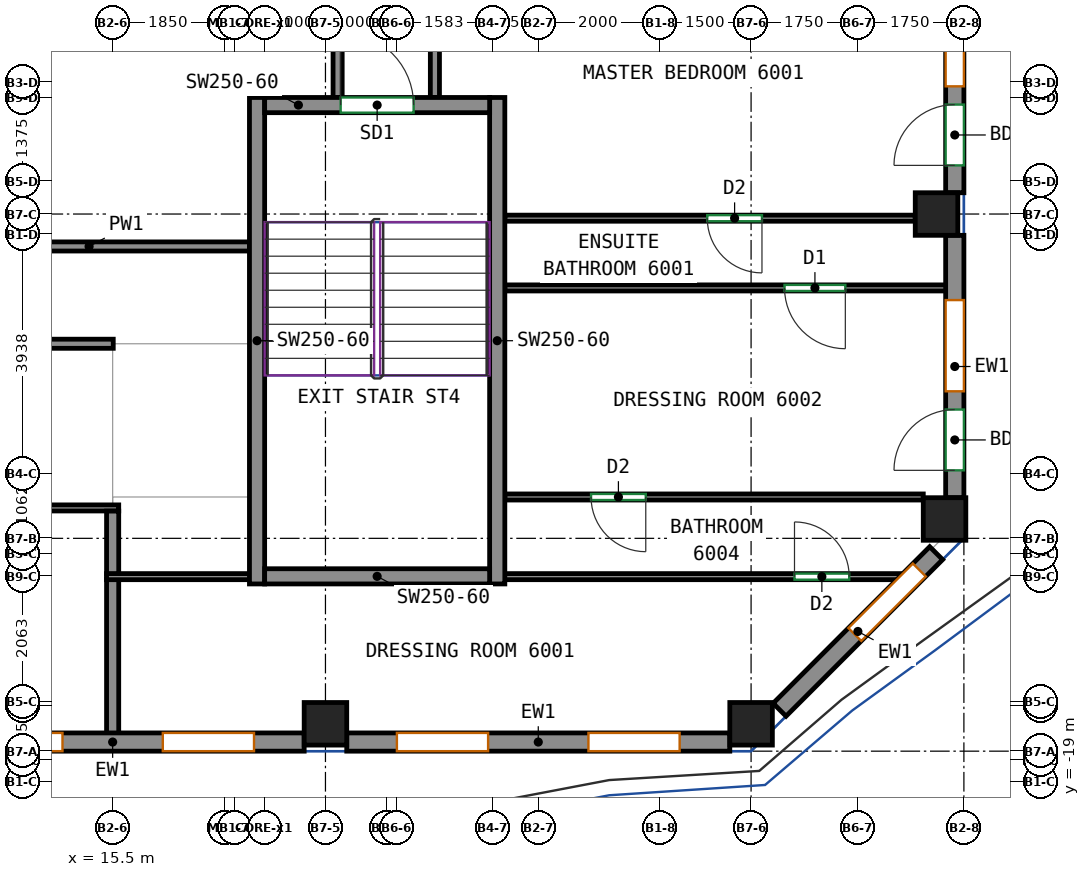
"""IFC4 building model, lengths in metres.
Left out: names, types, materials, properties, quantities, classifications, styles, units other than length and angle.
Written with IfcOpenShell. Run it as: python <this file> out.ifc"""

import sys

from ifc_helpers import new_model, si_unit, direction, frame, frame_2d, origin, origin_2d, place, context, subcontext, project, spatial, rectangle, extrude, source, transform, mapped, element, fill, save


model = new_model("IFC4")
c1 = context("Model", 3, precision=1e-05, world=origin(), true_north=direction((0.0, 1.0)))
c2 = subcontext(c1, "Body", "Model", "MODEL_VIEW")
j1 = project(units=[si_unit("LENGTHUNIT", "METRE"), si_unit("PLANEANGLEUNIT", "RADIAN")], contexts=[c1])
p1 = place(None, origin())
s1 = spatial("IfcSite", under=j1, at=p1, CompositionType="ELEMENT")
p2 = place(p1, origin())
s2 = spatial("IfcBuilding", under=s1, at=p2, CompositionType="ELEMENT")
p3 = place(p2, frame((0.0, 0.0, 249.2)))
s3 = spatial("IfcBuildingStorey", under=s2, at=p3, CompositionType="ELEMENT", Elevation=249.2)
m1 = source(origin(), c2, "Body", "SweptSolid", [
    extrude(rectangle(XDim=0.7, YDim=0.7, at=origin_2d()), origin(), (0.0, 0.0, 1.0), 3.12),
])
for number, where, z_axis, x_axis in (
    (1, (19.0, -18.05, 0.0), (0.0, 0.0, 1.0), (1.0, 0.0, 0.0)),
    (2, (26.0, -18.05, 0.0), (0.0, 0.0, 1.0), (1.0, 0.0, 0.0)),
    (3, (29.05, -9.667, 0.0), (0.0, 0.0, 1.0), (1.0, 0.0, 0.0)),
    (4, (29.182, -14.682, 0.0), (0.0, 0.0, 1.0), (1.0, 0.0, 0.0)),
):
    element("IfcColumn", number, at=place(p3, frame(where, z_axis=z_axis, x_axis=x_axis)), inside=s3, PredefinedType="COLUMN", context=c2, shape_type="MappedRepresentation", body=[
        mapped(m1, transform((0.0, 0.0, 0.0))),
    ])
m2 = source(origin(), c2, "Body", "SweptSolid", [
    extrude(rectangle(XDim=8.0, YDim=0.25, at=frame_2d((4.0, 0.0))), origin(), (0.0, 0.0, 1.0), 3.12),
])
for number, where, z_axis, x_axis in (
    (5, (17.875, -15.75, 0.0), (0.0, 0.0, 1.0), (0.0, 1.0, 0.0)),
    (6, (21.825, -15.75, 0.0), (0.0, 0.0, 1.0), (0.0, 1.0, 0.0)),
):
    element("IfcWall", number, at=place(p3, frame(where, z_axis=z_axis, x_axis=x_axis)), inside=s3, PredefinedType="SHEAR", context=c2, shape_type="MappedRepresentation", body=[
        mapped(m2, transform((0.0, 0.0, 0.0))),
    ])
m3 = source(origin(), c2, "Body", "SweptSolid", [
    extrude(rectangle(XDim=3.7, YDim=0.25, at=frame_2d((1.85, 0.0))), origin(), (0.0, 0.0, 1.0), 3.12),
])
p4 = place(p3, frame((18.0, -15.625, 0.0), z_axis=(0.0, 0.0, 1.0), x_axis=(1.0, 0.0, 0.0)))
e7 = element("IfcWall", 7, at=p4, inside=s3, PredefinedType="SHEAR", context=c2, shape_type="MappedRepresentation", body=[
    mapped(m3, transform((0.0, 0.0, 0.0))),
])
p5 = place(p3, frame((18.0, -7.875, 0.0), z_axis=(0.0, 0.0, 1.0), x_axis=(1.0, 0.0, 0.0)))
e8 = element("IfcWall", 8, at=p5, inside=s3, PredefinedType="SHEAR", context=c2, shape_type="MappedRepresentation", body=[
    mapped(m3, transform((0.0, 0.0, 0.0))),
])
p6 = place(p5, frame((1.25, 0.0, 0.0)))
e9 = element("IfcOpeningElement", 9, at=p6, cuts=e8, PredefinedType="OPENING", context=c2, shape_type="SweptSolid", body=[
    extrude(rectangle(XDim=1.2, YDim=2.1, at=frame_2d((0.6, 1.05))), frame((0.0, 0.135, 0.0), z_axis=(0.0, -1.0, 0.0), x_axis=(1.0, 0.0, 0.0)), (0.0, 0.0, 1.0), 0.27),
])
m4 = source(origin(), c2, "Body", "SweptSolid", [
    extrude(rectangle(XDim=6.3, YDim=0.3, at=frame_2d((3.15, 0.0))), origin(), (0.0, 0.0, 1.0), 3.12),
])
p7 = place(p3, frame((12.35, -18.35, 0.0), z_axis=(0.0, 0.0, 1.0), x_axis=(1.0, 0.0, 0.0)))
e10 = element("IfcWall", 10, at=p7, inside=s3, PredefinedType="SOLIDWALL", context=c2, shape_type="MappedRepresentation", body=[
    mapped(m4, transform((0.0, 0.0, 0.0))),
])
p8 = place(p7, frame((0.825, 0.0, 0.8)))
e11 = element("IfcOpeningElement", 11, at=p8, cuts=e10, PredefinedType="OPENING", context=c2, shape_type="SweptSolid", body=[
    extrude(rectangle(XDim=1.5, YDim=2.05, at=frame_2d((0.75, 1.025))), frame((0.0, 0.16, 0.0), z_axis=(0.0, -1.0, 0.0), x_axis=(1.0, 0.0, 0.0)), (0.0, 0.0, 1.0), 0.32),
])
p9 = place(p7, frame((3.975, 0.0, 0.8)))
e12 = element("IfcOpeningElement", 12, at=p9, cuts=e10, PredefinedType="OPENING", context=c2, shape_type="SweptSolid", body=[
    extrude(rectangle(XDim=1.5, YDim=2.05, at=frame_2d((0.75, 1.025))), frame((0.0, 0.16, 0.0), z_axis=(0.0, -1.0, 0.0), x_axis=(1.0, 0.0, 0.0)), (0.0, 0.0, 1.0), 0.32),
])
p10 = place(p3, frame((19.35, -18.35, 0.0), z_axis=(0.0, 0.0, 1.0), x_axis=(1.0, 0.0, 0.0)))
e13 = element("IfcWall", 13, at=p10, inside=s3, PredefinedType="SOLIDWALL", context=c2, shape_type="MappedRepresentation", body=[
    mapped(m4, transform((0.0, 0.0, 0.0))),
])
p11 = place(p10, frame((0.825, 0.0, 0.8)))
e14 = element("IfcOpeningElement", 14, at=p11, cuts=e13, PredefinedType="OPENING", context=c2, shape_type="SweptSolid", body=[
    extrude(rectangle(XDim=1.5, YDim=2.05, at=frame_2d((0.75, 1.025))), frame((0.0, 0.16, 0.0), z_axis=(0.0, -1.0, 0.0), x_axis=(1.0, 0.0, 0.0)), (0.0, 0.0, 1.0), 0.32),
])
p12 = place(p10, frame((3.975, 0.0, 0.8)))
e15 = element("IfcOpeningElement", 15, at=p12, cuts=e13, PredefinedType="OPENING", context=c2, shape_type="SweptSolid", body=[
    extrude(rectangle(XDim=1.5, YDim=2.05, at=frame_2d((0.75, 1.025))), frame((0.0, 0.16, 0.0), z_axis=(0.0, -1.0, 0.0), x_axis=(1.0, 0.0, 0.0)), (0.0, 0.0, 1.0), 0.32),
])
m5 = source(origin(), c2, "Body", "SweptSolid", [
    extrude(rectangle(XDim=3.642, YDim=0.3, at=frame_2d((1.821, 0.0))), origin(), (0.0, 0.0, 1.0), 3.12),
])
p13 = place(p3, frame((26.469, -17.819, 0.0), z_axis=(0.0, 0.0, 1.0), x_axis=(0.707106781187, 0.707106781187, 0.0)))
e16 = element("IfcWall", 16, at=p13, inside=s3, PredefinedType="SOLIDWALL", context=c2, shape_type="MappedRepresentation", body=[
    mapped(m5, transform((0.0, 0.0, 0.0))),
])
p14 = place(p13, frame((1.75, 0.0, 0.8)))
e17 = element("IfcOpeningElement", 17, at=p14, cuts=e16, PredefinedType="OPENING", context=c2, shape_type="SweptSolid", body=[
    extrude(rectangle(XDim=1.5, YDim=2.05, at=frame_2d((0.75, 1.025))), frame((0.0, 0.16, 0.0), z_axis=(0.0, -1.0, 0.0), x_axis=(1.0, 0.0, 0.0)), (0.0, 0.0, 1.0), 0.32),
])
m6 = source(origin(), c2, "Body", "SweptSolid", [
    extrude(rectangle(XDim=4.315, YDim=0.3, at=frame_2d((2.158, 0.0))), origin(), (0.0, 0.0, 1.0), 3.12),
])
p15 = place(p3, frame((29.35, -14.332, 0.0), z_axis=(0.0, 0.0, 1.0), x_axis=(0.0, 1.0, 0.0)))
e18 = element("IfcWall", 18, at=p15, inside=s3, PredefinedType="SOLIDWALL", context=c2, shape_type="MappedRepresentation", body=[
    mapped(m6, transform((0.0, 0.0, 0.0))),
])
p16 = place(p15, frame((1.75, 0.0, 0.8)))
e19 = element("IfcOpeningElement", 19, at=p16, cuts=e18, PredefinedType="OPENING", context=c2, shape_type="SweptSolid", body=[
    extrude(rectangle(XDim=1.5, YDim=2.05, at=frame_2d((0.75, 1.025))), frame((0.0, 0.16, 0.0), z_axis=(0.0, -1.0, 0.0), x_axis=(1.0, 0.0, 0.0)), (0.0, 0.0, 1.0), 0.32),
])
p17 = place(p15, frame((0.45, 0.0, 0.0)))
e20 = element("IfcOpeningElement", 20, at=p17, cuts=e18, PredefinedType="OPENING", context=c2, shape_type="SweptSolid", body=[
    extrude(rectangle(XDim=1.0, YDim=2.1, at=frame_2d((0.5, 1.05))), frame((0.0, 0.16, 0.0), z_axis=(0.0, -1.0, 0.0), x_axis=(1.0, 0.0, 0.0)), (0.0, 0.0, 1.0), 0.32),
])
m7 = source(origin(), c2, "Body", "SweptSolid", [
    extrude(rectangle(XDim=8.133, YDim=0.3, at=frame_2d((4.067, 0.0))), origin(), (0.0, 0.0, 1.0), 3.12),
])
p18 = place(p3, frame((29.35, -9.317, 0.0), z_axis=(0.0, 0.0, 1.0), x_axis=(0.0, 1.0, 0.0)))
e21 = element("IfcWall", 21, at=p18, inside=s3, PredefinedType="SOLIDWALL", context=c2, shape_type="MappedRepresentation", body=[
    mapped(m7, transform((0.0, 0.0, 0.0))),
])
p19 = place(p18, frame((1.75, 0.0, 0.8)))
e22 = element("IfcOpeningElement", 22, at=p19, cuts=e21, PredefinedType="OPENING", context=c2, shape_type="SweptSolid", body=[
    extrude(rectangle(XDim=1.5, YDim=2.05, at=frame_2d((0.75, 1.025))), frame((0.0, 0.16, 0.0), z_axis=(0.0, -1.0, 0.0), x_axis=(1.0, 0.0, 0.0)), (0.0, 0.0, 1.0), 0.32),
])
p20 = place(p18, frame((0.45, 0.0, 0.0)))
e23 = element("IfcOpeningElement", 23, at=p20, cuts=e21, PredefinedType="OPENING", context=c2, shape_type="SweptSolid", body=[
    extrude(rectangle(XDim=1.0, YDim=2.1, at=frame_2d((0.5, 1.05))), frame((0.0, 0.16, 0.0), z_axis=(0.0, -1.0, 0.0), x_axis=(1.0, 0.0, 0.0)), (0.0, 0.0, 1.0), 0.32),
])
p21 = place(p18, frame((5.817, 0.0, 0.8)))
e24 = element("IfcOpeningElement", 24, at=p21, cuts=e21, PredefinedType="OPENING", context=c2, shape_type="SweptSolid", body=[
    extrude(rectangle(XDim=1.5, YDim=2.05, at=frame_2d((0.75, 1.025))), frame((0.0, 0.16, 0.0), z_axis=(0.0, -1.0, 0.0), x_axis=(1.0, 0.0, 0.0)), (0.0, 0.0, 1.0), 0.32),
])
p22 = place(p18, frame((4.517, 0.0, 0.0)))
e25 = element("IfcOpeningElement", 25, at=p22, cuts=e21, PredefinedType="OPENING", context=c2, shape_type="SweptSolid", body=[
    extrude(rectangle(XDim=1.0, YDim=2.1, at=frame_2d((0.5, 1.05))), frame((0.0, 0.16, 0.0), z_axis=(0.0, -1.0, 0.0), x_axis=(1.0, 0.0, 0.0)), (0.0, 0.0, 1.0), 0.32),
])
p23 = place(p3, frame((-11.8, -11.8, 0.0), z_axis=(0.0, 0.0, 1.0), x_axis=(1.0, 0.0, 0.0)))
e26 = element("IfcWall", 26, at=p23, inside=s3, PredefinedType="PARTITIONING", context=c2, shape_type="SweptSolid", body=[
    extrude(rectangle(XDim=27.31, YDim=0.15, at=frame_2d((13.655, 0.0))), origin(), (0.0, 0.0, 1.0), 3.12),
])
p24 = place(p23, frame((5.021, 0.0, 0.0)))
e27 = element("IfcOpeningElement", 27, at=p24, cuts=e26, PredefinedType="OPENING", context=c2, shape_type="SweptSolid", body=[
    extrude(rectangle(XDim=1.0, YDim=2.1, at=frame_2d((0.5, 1.05))), frame((0.0, 0.085, 0.0), z_axis=(0.0, -1.0, 0.0), x_axis=(1.0, 0.0, 0.0)), (0.0, 0.0, 1.0), 0.17),
])
p25 = place(p23, frame((18.457, 0.0, 0.0)))
e28 = element("IfcOpeningElement", 28, at=p25, cuts=e26, PredefinedType="OPENING", context=c2, shape_type="SweptSolid", body=[
    extrude(rectangle(XDim=1.0, YDim=2.1, at=frame_2d((0.5, 1.05))), frame((0.0, 0.085, 0.0), z_axis=(0.0, -1.0, 0.0), x_axis=(1.0, 0.0, 0.0)), (0.0, 0.0, 1.0), 0.17),
])
p26 = place(p3, frame((20.8, -7.75, 0.0), z_axis=(0.0, 0.0, 1.0), x_axis=(0.0, 1.0, 0.0)))
e29 = element("IfcWall", 29, at=p26, inside=s3, PredefinedType="PARTITIONING", context=c2, shape_type="SweptSolid", body=[
    extrude(rectangle(XDim=1.686, YDim=0.15, at=frame_2d((0.843, 0.0))), origin(), (0.0, 0.0, 1.0), 3.12),
])
p27 = place(p3, frame((19.2, -7.75, 0.0), z_axis=(0.0, 0.0, 1.0), x_axis=(0.0, 1.0, 0.0)))
e30 = element("IfcWall", 30, at=p27, inside=s3, PredefinedType="PARTITIONING", context=c2, shape_type="SweptSolid", body=[
    extrude(rectangle(XDim=2.41, YDim=0.15, at=frame_2d((1.205, 0.0))), origin(), (0.0, 0.0, 1.0), 3.12),
])
p28 = place(p3, frame((12.475, -10.2, 0.0), z_axis=(0.0, 0.0, 1.0), x_axis=(1.0, 0.0, 0.0)))
e31 = element("IfcWall", 31, at=p28, inside=s3, PredefinedType="PARTITIONING", context=c2, shape_type="SweptSolid", body=[
    extrude(rectangle(XDim=5.275, YDim=0.15, at=frame_2d((2.637, 0.0))), origin(), (0.0, 0.0, 1.0), 3.12),
])
p29 = place(p3, frame((-9.06, -14.5, 0.0), z_axis=(0.0, 0.0, 1.0), x_axis=(1.0, 0.0, 0.0)))
e32 = element("IfcWall", 32, at=p29, inside=s3, PredefinedType="PARTITIONING", context=c2, shape_type="SweptSolid", body=[
    extrude(rectangle(XDim=24.66, YDim=0.1, at=frame_2d((12.33, 0.0))), origin(), (0.0, 0.0, 1.0), 3.12),
])
p30 = place(p29, frame((0.924, 0.0, 0.0)))
e33 = element("IfcOpeningElement", 33, at=p30, cuts=e32, PredefinedType="OPENING", context=c2, shape_type="SweptSolid", body=[
    extrude(rectangle(XDim=1.0, YDim=2.1, at=frame_2d((0.5, 1.05))), frame((0.0, 0.06, 0.0), z_axis=(0.0, -1.0, 0.0), x_axis=(1.0, 0.0, 0.0)), (0.0, 0.0, 1.0), 0.12),
])
p31 = place(p29, frame((15.945, 0.0, 0.0)))
e34 = element("IfcOpeningElement", 34, at=p31, cuts=e32, PredefinedType="OPENING", context=c2, shape_type="SweptSolid", body=[
    extrude(rectangle(XDim=1.0, YDim=2.1, at=frame_2d((0.5, 1.05))), frame((0.0, 0.06, 0.0), z_axis=(0.0, -1.0, 0.0), x_axis=(1.0, 0.0, 0.0)), (0.0, 0.0, 1.0), 0.12),
])
p32 = place(p29, frame((18.387, 0.0, 0.0)))
e35 = element("IfcOpeningElement", 35, at=p32, cuts=e32, PredefinedType="OPENING", context=c2, shape_type="SweptSolid", body=[
    extrude(rectangle(XDim=1.0, YDim=2.1, at=frame_2d((0.5, 1.05))), frame((0.0, 0.06, 0.0), z_axis=(0.0, -1.0, 0.0), x_axis=(1.0, 0.0, 0.0)), (0.0, 0.0, 1.0), 0.12),
])
p33 = place(p3, frame((15.5, -18.25, 0.0), z_axis=(0.0, 0.0, 1.0), x_axis=(0.0, 1.0, 0.0)))
e36 = element("IfcWall", 36, at=p33, inside=s3, PredefinedType="PARTITIONING", context=c2, shape_type="SweptSolid", body=[
    extrude(rectangle(XDim=2.58, YDim=0.2, at=frame_2d((1.29, 0.0))), origin(), (0.0, 0.0, 1.0), 3.12),
])
p34 = place(p3, frame((15.5, -15.59, 0.0), z_axis=(0.0, 0.0, 1.0), x_axis=(0.0, 1.0, 0.0)))
e37 = element("IfcWall", 37, at=p34, inside=s3, PredefinedType="PARTITIONING", context=c2, shape_type="SweptSolid", body=[
    extrude(rectangle(XDim=1.038, YDim=0.2, at=frame_2d((0.519, 0.0))), origin(), (0.0, 0.0, 1.0), 3.12),
])
p35 = place(p3, frame((21.9, -15.63, 0.0), z_axis=(0.0, 0.0, 1.0), x_axis=(1.0, 0.0, 0.0)))
e38 = element("IfcWall", 38, at=p35, inside=s3, PredefinedType="PARTITIONING", context=c2, shape_type="SweptSolid", body=[
    extrude(rectangle(XDim=6.616, YDim=0.1, at=frame_2d((3.308, 0.0))), origin(), (0.0, 0.0, 1.0), 3.12),
])
p36 = place(p35, frame((4.814, 0.0, 0.0)))
e39 = element("IfcOpeningElement", 39, at=p36, cuts=e38, PredefinedType="OPENING", context=c2, shape_type="SweptSolid", body=[
    extrude(rectangle(XDim=0.9, YDim=2.1, at=frame_2d((0.45, 1.05))), frame((0.0, 0.06, 0.0), z_axis=(0.0, -1.0, 0.0), x_axis=(1.0, 0.0, 0.0)), (0.0, 0.0, 1.0), 0.12),
])
p37 = place(p3, frame((15.4, -15.63, 0.0), z_axis=(0.0, 0.0, 1.0), x_axis=(1.0, 0.0, 0.0)))
e40 = element("IfcWall", 40, at=p37, inside=s3, PredefinedType="PARTITIONING", context=c2, shape_type="SweptSolid", body=[
    extrude(rectangle(XDim=2.4, YDim=0.1, at=frame_2d((1.2, 0.0))), origin(), (0.0, 0.0, 1.0), 3.12),
])
p38 = place(p3, frame((28.832, -14.32, 0.0), z_axis=(0.0, 0.0, 1.0), x_axis=(-1.0, 0.0, 0.0)))
e41 = element("IfcWall", 41, at=p38, inside=s3, PredefinedType="PARTITIONING", context=c2, shape_type="SweptSolid", body=[
    extrude(rectangle(XDim=6.882, YDim=0.1, at=frame_2d((3.441, 0.0))), origin(), (0.0, 0.0, 1.0), 3.12),
])
p39 = place(p38, frame((4.564, 0.0, 0.0)))
e42 = element("IfcOpeningElement", 42, at=p39, cuts=e41, PredefinedType="OPENING", context=c2, shape_type="SweptSolid", body=[
    extrude(rectangle(XDim=0.9, YDim=2.1, at=frame_2d((0.45, 1.05))), frame((0.0, 0.06, 0.0), z_axis=(0.0, -1.0, 0.0), x_axis=(1.0, 0.0, 0.0)), (0.0, 0.0, 1.0), 0.12),
])
p40 = place(p3, frame((29.25, -10.882, 0.0), z_axis=(0.0, 0.0, 1.0), x_axis=(-1.0, 0.0, 0.0)))
e43 = element("IfcWall", 43, at=p40, inside=s3, PredefinedType="PARTITIONING", context=c2, shape_type="SweptSolid", body=[
    extrude(rectangle(XDim=7.3, YDim=0.1, at=frame_2d((3.65, 0.0))), origin(), (0.0, 0.0, 1.0), 3.12),
])
p41 = place(p40, frame((1.7, 0.0, 0.0)))
e44 = element("IfcOpeningElement", 44, at=p41, cuts=e43, PredefinedType="OPENING", context=c2, shape_type="SweptSolid", body=[
    extrude(rectangle(XDim=1.0, YDim=2.1, at=frame_2d((0.5, 1.05))), frame((0.0, 0.06, 0.0), z_axis=(0.0, -1.0, 0.0), x_axis=(1.0, 0.0, 0.0)), (0.0, 0.0, 1.0), 0.12),
])
p42 = place(p3, frame((28.7, -9.735, 0.0), z_axis=(0.0, 0.0, 1.0), x_axis=(-1.0, 0.0, 0.0)))
e45 = element("IfcWall", 45, at=p42, inside=s3, PredefinedType="PARTITIONING", context=c2, shape_type="SweptSolid", body=[
    extrude(rectangle(XDim=6.75, YDim=0.1, at=frame_2d((3.375, 0.0))), origin(), (0.0, 0.0, 1.0), 3.12),
])
p43 = place(p42, frame((2.521, 0.0, 0.0)))
e46 = element("IfcOpeningElement", 46, at=p43, cuts=e45, PredefinedType="OPENING", context=c2, shape_type="SweptSolid", body=[
    extrude(rectangle(XDim=0.9, YDim=2.1, at=frame_2d((0.45, 1.05))), frame((0.0, 0.06, 0.0), z_axis=(0.0, -1.0, 0.0), x_axis=(1.0, 0.0, 0.0)), (0.0, 0.0, 1.0), 0.12),
])
p44 = place(p8, origin())
e47 = element("IfcWindow", 47, at=p44, inside=s3, PartitioningType="SINGLE_PANEL", PredefinedType="WINDOW", context=c2, shape_type="SweptSolid", body=[
    extrude(rectangle(XDim=1.5, YDim=2.05, at=frame_2d((0.75, 1.025))), frame((0.0, 0.03, 0.0), z_axis=(0.0, -1.0, 0.0), x_axis=(1.0, 0.0, 0.0)), (0.0, 0.0, 1.0), 0.06),
])
fill(e11, e47)
p45 = place(p9, origin())
e48 = element("IfcWindow", 48, at=p45, inside=s3, PartitioningType="SINGLE_PANEL", PredefinedType="WINDOW", context=c2, shape_type="SweptSolid", body=[
    extrude(rectangle(XDim=1.5, YDim=2.05, at=frame_2d((0.75, 1.025))), frame((0.0, 0.03, 0.0), z_axis=(0.0, -1.0, 0.0), x_axis=(1.0, 0.0, 0.0)), (0.0, 0.0, 1.0), 0.06),
])
fill(e12, e48)
p46 = place(p11, origin())
e49 = element("IfcWindow", 49, at=p46, inside=s3, PartitioningType="SINGLE_PANEL", PredefinedType="WINDOW", context=c2, shape_type="SweptSolid", body=[
    extrude(rectangle(XDim=1.5, YDim=2.05, at=frame_2d((0.75, 1.025))), frame((0.0, 0.03, 0.0), z_axis=(0.0, -1.0, 0.0), x_axis=(1.0, 0.0, 0.0)), (0.0, 0.0, 1.0), 0.06),
])
fill(e14, e49)
p47 = place(p12, origin())
e50 = element("IfcWindow", 50, at=p47, inside=s3, PartitioningType="SINGLE_PANEL", PredefinedType="WINDOW", context=c2, shape_type="SweptSolid", body=[
    extrude(rectangle(XDim=1.5, YDim=2.05, at=frame_2d((0.75, 1.025))), frame((0.0, 0.03, 0.0), z_axis=(0.0, -1.0, 0.0), x_axis=(1.0, 0.0, 0.0)), (0.0, 0.0, 1.0), 0.06),
])
fill(e15, e50)
p48 = place(p14, origin())
e51 = element("IfcWindow", 51, at=p48, inside=s3, PartitioningType="SINGLE_PANEL", PredefinedType="WINDOW", context=c2, shape_type="SweptSolid", body=[
    extrude(rectangle(XDim=1.5, YDim=2.05, at=frame_2d((0.75, 1.025))), frame((0.0, 0.03, 0.0), z_axis=(0.0, -1.0, 0.0), x_axis=(1.0, 0.0, 0.0)), (0.0, 0.0, 1.0), 0.06),
])
fill(e17, e51)
p49 = place(p16, origin())
e52 = element("IfcWindow", 52, at=p49, inside=s3, PartitioningType="SINGLE_PANEL", PredefinedType="WINDOW", context=c2, shape_type="SweptSolid", body=[
    extrude(rectangle(XDim=1.5, YDim=2.05, at=frame_2d((0.75, 1.025))), frame((0.0, 0.03, 0.0), z_axis=(0.0, -1.0, 0.0), x_axis=(1.0, 0.0, 0.0)), (0.0, 0.0, 1.0), 0.06),
])
fill(e19, e52)
p50 = place(p17, origin())
e53 = element("IfcDoor", 53, at=p50, inside=s3, OperationType="SINGLE_SWING_LEFT", PredefinedType="DOOR", context=c2, shape_type="SweptSolid", body=[
    extrude(rectangle(XDim=1.0, YDim=2.1, at=frame_2d((0.5, 1.05))), frame((0.0, 0.025, 0.0), z_axis=(0.0, -1.0, 0.0), x_axis=(1.0, 0.0, 0.0)), (0.0, 0.0, 1.0), 0.05),
])
fill(e20, e53)
p51 = place(p19, origin())
e54 = element("IfcWindow", 54, at=p51, inside=s3, PartitioningType="SINGLE_PANEL", PredefinedType="WINDOW", context=c2, shape_type="SweptSolid", body=[
    extrude(rectangle(XDim=1.5, YDim=2.05, at=frame_2d((0.75, 1.025))), frame((0.0, 0.03, 0.0), z_axis=(0.0, -1.0, 0.0), x_axis=(1.0, 0.0, 0.0)), (0.0, 0.0, 1.0), 0.06),
])
fill(e22, e54)
p52 = place(p20, origin())
e55 = element("IfcDoor", 55, at=p52, inside=s3, OperationType="SINGLE_SWING_LEFT", PredefinedType="DOOR", context=c2, shape_type="SweptSolid", body=[
    extrude(rectangle(XDim=1.0, YDim=2.1, at=frame_2d((0.5, 1.05))), frame((0.0, 0.025, 0.0), z_axis=(0.0, -1.0, 0.0), x_axis=(1.0, 0.0, 0.0)), (0.0, 0.0, 1.0), 0.05),
])
fill(e23, e55)
p53 = place(p6, origin())
e56 = element("IfcDoor", 56, at=p53, inside=s3, OperationType="DOUBLE_DOOR_SINGLE_SWING", PredefinedType="DOOR", context=c2, shape_type="SweptSolid", body=[
    extrude(rectangle(XDim=1.2, YDim=2.1, at=frame_2d((0.6, 1.05))), frame((0.0, 0.025, 0.0), z_axis=(0.0, -1.0, 0.0), x_axis=(1.0, 0.0, 0.0)), (0.0, 0.0, 1.0), 0.05),
])
fill(e9, e56)
p54 = place(p36, origin())
e57 = element("IfcDoor", 57, at=p54, inside=s3, OperationType="SINGLE_SWING_LEFT", PredefinedType="DOOR", context=c2, shape_type="SweptSolid", body=[
    extrude(rectangle(XDim=0.9, YDim=2.1, at=frame_2d((0.45, 1.05))), frame((0.0, 0.025, 0.0), z_axis=(0.0, -1.0, 0.0), x_axis=(1.0, 0.0, 0.0)), (0.0, 0.0, 1.0), 0.05),
])
fill(e39, e57)
p55 = place(p39, origin())
e58 = element("IfcDoor", 58, at=p55, inside=s3, OperationType="SINGLE_SWING_LEFT", PredefinedType="DOOR", context=c2, shape_type="SweptSolid", body=[
    extrude(rectangle(XDim=0.9, YDim=2.1, at=frame_2d((0.45, 1.05))), frame((0.0, 0.025, 0.0), z_axis=(0.0, -1.0, 0.0), x_axis=(1.0, 0.0, 0.0)), (0.0, 0.0, 1.0), 0.05),
])
fill(e42, e58)
p56 = place(p41, origin())
e59 = element("IfcDoor", 59, at=p56, inside=s3, OperationType="SINGLE_SWING_LEFT", PredefinedType="DOOR", context=c2, shape_type="SweptSolid", body=[
    extrude(rectangle(XDim=1.0, YDim=2.1, at=frame_2d((0.5, 1.05))), frame((0.0, 0.025, 0.0), z_axis=(0.0, -1.0, 0.0), x_axis=(1.0, 0.0, 0.0)), (0.0, 0.0, 1.0), 0.05),
])
fill(e44, e59)
p57 = place(p43, origin())
e60 = element("IfcDoor", 60, at=p57, inside=s3, OperationType="SINGLE_SWING_LEFT", PredefinedType="DOOR", context=c2, shape_type="SweptSolid", body=[
    extrude(rectangle(XDim=0.9, YDim=2.1, at=frame_2d((0.45, 1.05))), frame((0.0, 0.025, 0.0), z_axis=(0.0, -1.0, 0.0), x_axis=(1.0, 0.0, 0.0)), (0.0, 0.0, 1.0), 0.05),
])
fill(e46, e60)
save(model, sys.argv[1])
